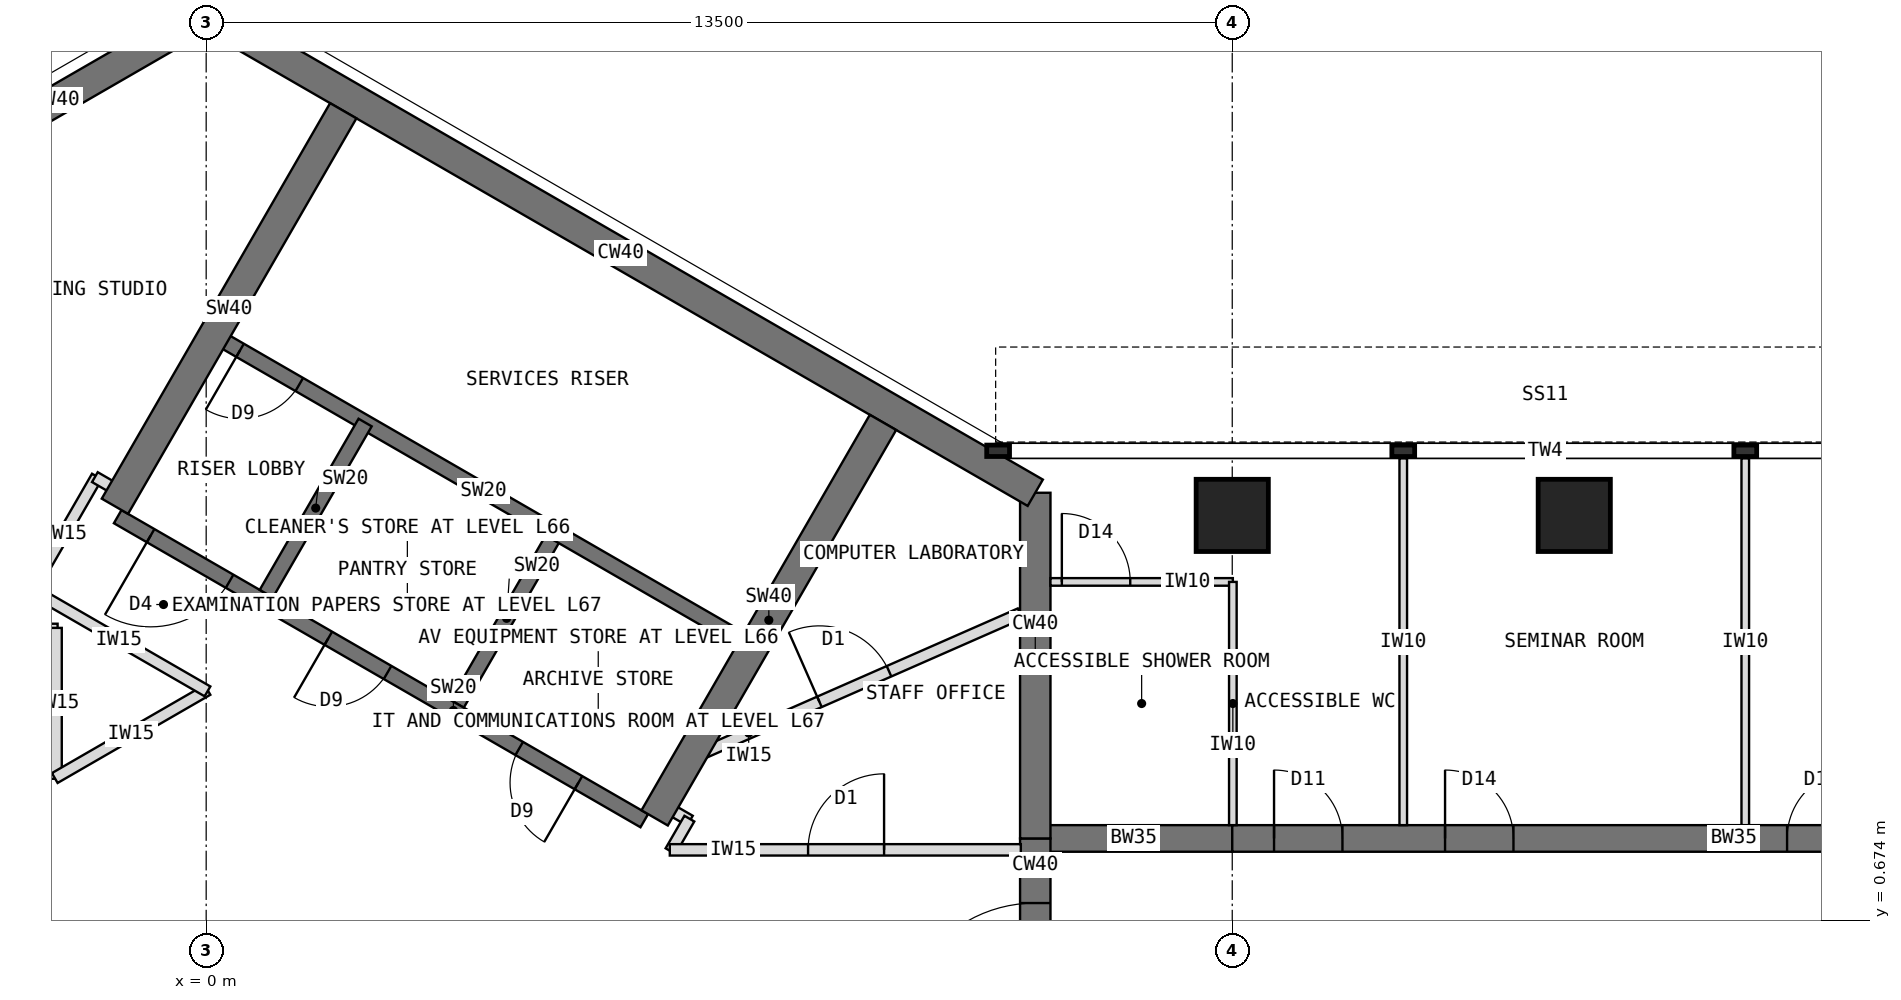
"""IFC4 building model, lengths in metres.
Left out: names, types, materials, properties, quantities, classifications, styles, units other than length and angle.
Written with IfcOpenShell. Run it as: python <this file> out.ifc"""

import sys

from ifc_helpers import new_model, si_unit, direction, frame, frame_2d, origin, origin_2d, place, context, subcontext, project, spatial, rectangle, extrude, element, fill, save


model = new_model("IFC4")
c1 = context("Model", 3, precision=1e-05, world=origin(), true_north=direction((0.0, 1.0)))
c2 = subcontext(c1, "Body", "Model", "MODEL_VIEW")
j1 = project(units=[si_unit("LENGTHUNIT", "METRE"), si_unit("PLANEANGLEUNIT", "RADIAN")], contexts=[c1])
p1 = place(None, origin())
s1 = spatial("IfcSite", under=j1, at=p1, CompositionType="ELEMENT")
p2 = place(p1, origin())
s2 = spatial("IfcBuilding", under=s1, at=p2, CompositionType="ELEMENT")
p3 = place(p2, frame((0.0, 0.0, 267.5)))
s3 = spatial("IfcBuildingStorey", under=s2, at=p3, CompositionType="ELEMENT", Elevation=267.5)
p4 = place(p3, frame((10.908, -1.75, 0.0), z_axis=(0.0, 0.0, 1.0), x_axis=(0.0, 1.0, 0.0)))
e1 = element("IfcWall", 1, at=p4, inside=s3, PredefinedType="SHEAR", context=c2, shape_type="SweptSolid", body=[
    extrude(rectangle(XDim=3.5, YDim=0.4, at=frame_2d((1.75, 0.0))), origin(), (0.0, 0.0, 1.0), 4.0),
])
p5 = place(p4, frame((0.85, 0.0, 0.0)))
e2 = element("IfcOpeningElement", 2, at=p5, cuts=e1, PredefinedType="OPENING", context=c2, shape_type="SweptSolid", body=[
    extrude(rectangle(XDim=1.8, YDim=2.1, at=frame_2d((0.9, 1.05))), frame((0.0, 0.21, 0.0), z_axis=(0.0, -1.0, 0.0), x_axis=(1.0, 0.0, 0.0)), (0.0, 0.0, 1.0), 0.42),
])
p6 = place(p3, frame((10.908, 1.75, 0.0), z_axis=(0.0, 0.0, 1.0), x_axis=(0.0, 1.0, 0.0)))
e3 = element("IfcWall", 3, at=p6, inside=s3, PredefinedType="SHEAR", context=c2, shape_type="SweptSolid", body=[
    extrude(rectangle(XDim=4.548, YDim=0.4, at=frame_2d((2.274, 0.0))), origin(), (0.0, 0.0, 1.0), 4.0),
])
p7 = place(p3, frame((10.908, 6.298, 0.0), z_axis=(0.0, 0.0, 1.0), x_axis=(-0.866021940709, 0.500005998175, 0.0)))
e4 = element("IfcWall", 4, at=p7, inside=s3, PredefinedType="SHEAR", context=c2, shape_type="SweptSolid", body=[
    extrude(rectangle(XDim=12.596, YDim=0.4, at=frame_2d((6.298, 0.0))), origin(), (0.0, 0.0, 1.0), 4.0),
])
p8 = place(p3, frame((0.0, 12.596, 0.0), z_axis=(0.0, 0.0, 1.0), x_axis=(-0.866011268655, -0.500024481964, 0.0)))
e5 = element("IfcWall", 5, at=p8, inside=s3, PredefinedType="SHEAR", context=c2, shape_type="SweptSolid", body=[
    extrude(rectangle(XDim=4.548, YDim=0.4, at=frame_2d((2.274, 0.0))), origin(), (0.0, 0.0, 1.0), 4.0),
])
p9 = place(p3, frame((10.908, 1.75, 0.0), z_axis=(0.0, 0.0, 1.0), x_axis=(1.0, 0.0, 0.0)))
e6 = element("IfcWall", 6, at=p9, inside=s3, PredefinedType="SHEAR", context=c2, shape_type="SweptSolid", body=[
    extrude(rectangle(XDim=2.592, YDim=0.35, at=frame_2d((1.296, 0.0))), origin(), (0.0, 0.0, 1.0), 4.0),
])
p10 = place(p3, frame((13.5, 1.75, 0.0), z_axis=(0.0, 0.0, 1.0), x_axis=(1.0, 0.0, 0.0)))
e7 = element("IfcWall", 7, at=p10, inside=s3, PredefinedType="SHEAR", context=c2, shape_type="SweptSolid", body=[
    extrude(rectangle(XDim=13.2, YDim=0.35, at=frame_2d((6.6, 0.0))), origin(), (0.0, 0.0, 1.0), 4.0),
])
p11 = place(p10, frame((0.55, 0.0, 0.0)))
e8 = element("IfcOpeningElement", 8, at=p11, cuts=e7, PredefinedType="OPENING", context=c2, shape_type="SweptSolid", body=[
    extrude(rectangle(XDim=0.9, YDim=2.1, at=frame_2d((0.45, 1.05))), frame((0.0, 0.185, 0.0), z_axis=(0.0, -1.0, 0.0), x_axis=(1.0, 0.0, 0.0)), (0.0, 0.0, 1.0), 0.37),
])
p12 = place(p10, frame((2.8, 0.0, 0.0)))
e9 = element("IfcOpeningElement", 9, at=p12, cuts=e7, PredefinedType="OPENING", context=c2, shape_type="SweptSolid", body=[
    extrude(rectangle(XDim=0.9, YDim=2.1, at=frame_2d((0.45, 1.05))), frame((0.0, 0.185, 0.0), z_axis=(0.0, -1.0, 0.0), x_axis=(1.0, 0.0, 0.0)), (0.0, 0.0, 1.0), 0.37),
])
p13 = place(p10, frame((7.3, 0.0, 0.0)))
e10 = element("IfcOpeningElement", 10, at=p13, cuts=e7, PredefinedType="OPENING", context=c2, shape_type="SweptSolid", body=[
    extrude(rectangle(XDim=0.9, YDim=2.1, at=frame_2d((0.45, 1.05))), frame((0.0, 0.185, 0.0), z_axis=(0.0, -1.0, 0.0), x_axis=(1.0, 0.0, 0.0)), (0.0, 0.0, 1.0), 0.37),
])
for number, where, z_axis, x_axis in (
    (11, (13.5, 6.0, 0.0), (0.0, 0.0, 1.0), (1.0, 0.0, 0.0)),
    (12, (18.0, 6.0, 0.0), (0.0, 0.0, 1.0), (1.0, 0.0, 0.0)),
):
    element("IfcColumn", number, at=place(p3, frame(where, z_axis=z_axis, x_axis=x_axis)), inside=s3, PredefinedType="COLUMN", context=c2, shape_type="SweptSolid", body=[
        extrude(rectangle(XDim=0.95, YDim=0.95, at=origin_2d()), origin(), (0.0, 0.0, 1.0), 4.0),
    ])
p14 = place(p3, frame((5.764, 1.984, 0.0), z_axis=(0.0, 0.0, 1.0), x_axis=(-0.866026010844, 0.49999894854, 0.0)))
e13 = element("IfcWall", 13, at=p14, inside=s3, PredefinedType="SHEAR", context=c2, shape_type="SweptSolid", body=[
    extrude(rectangle(XDim=8.0, YDim=0.2, at=frame_2d((4.0, 0.0))), origin(), (0.0, 0.0, 1.0), 4.0),
])
p15 = place(p14, frame((6.3, 0.0, 0.0)))
e14 = element("IfcOpeningElement", 14, at=p15, cuts=e13, PredefinedType="OPENING", context=c2, shape_type="SweptSolid", body=[
    extrude(rectangle(XDim=1.2, YDim=2.1, at=frame_2d((0.6, 1.05))), frame((0.0, 0.11, 0.0), z_axis=(0.0, -1.0, 0.0), x_axis=(1.0, 0.0, 0.0)), (0.0, 0.0, 1.0), 0.22),
])
p16 = place(p14, frame((1.0, 0.0, 0.0)))
e15 = element("IfcOpeningElement", 15, at=p16, cuts=e13, PredefinedType="OPENING", context=c2, shape_type="SweptSolid", body=[
    extrude(rectangle(XDim=0.9, YDim=2.1, at=frame_2d((0.45, 1.05))), frame((0.0, 0.11, 0.0), z_axis=(0.0, -1.0, 0.0), x_axis=(1.0, 0.0, 0.0)), (0.0, 0.0, 1.0), 0.22),
])
p17 = place(p14, frame((3.9, 0.0, 0.0)))
e16 = element("IfcOpeningElement", 16, at=p17, cuts=e13, PredefinedType="OPENING", context=c2, shape_type="SweptSolid", body=[
    extrude(rectangle(XDim=0.9, YDim=2.1, at=frame_2d((0.45, 1.05))), frame((0.0, 0.11, 0.0), z_axis=(0.0, -1.0, 0.0), x_axis=(1.0, 0.0, 0.0)), (0.0, 0.0, 1.0), 0.22),
])
for number, where, z_axis, x_axis in (
    (17, (3.303, 3.52, 0.0), (0.0, 0.0, 1.0), (0.5, 0.866, 0.0)),
    (18, (0.791, 4.97, 0.0), (0.0, 0.0, 1.0), (0.5, 0.866, 0.0)),
):
    element("IfcWall", number, at=place(p3, frame(where, z_axis=z_axis, x_axis=x_axis)), inside=s3, PredefinedType="SHEAR", context=c2, shape_type="SweptSolid", body=[
        extrude(rectangle(XDim=2.6, YDim=0.2, at=frame_2d((1.3, 0.0))), origin(), (0.0, 0.0, 1.0), 4.0),
    ])
p18 = place(p3, frame((7.114, 4.322, 0.0), z_axis=(0.0, 0.0, 1.0), x_axis=(-0.866026010844, 0.49999894854, 0.0)))
e19 = element("IfcWall", 19, at=p18, inside=s3, PredefinedType="SHEAR", context=c2, shape_type="SweptSolid", body=[
    extrude(rectangle(XDim=8.0, YDim=0.2, at=frame_2d((4.0, 0.0))), origin(), (0.0, 0.0, 1.0), 4.0),
])
p19 = place(p18, frame((6.8, 0.0, 0.0)))
e20 = element("IfcOpeningElement", 20, at=p19, cuts=e19, PredefinedType="OPENING", context=c2, shape_type="SweptSolid", body=[
    extrude(rectangle(XDim=0.9, YDim=2.1, at=frame_2d((0.45, 1.05))), frame((0.0, 0.11, 0.0), z_axis=(0.0, -1.0, 0.0), x_axis=(1.0, 0.0, 0.0)), (0.0, 0.0, 1.0), 0.22),
])
for number, where, z_axis, x_axis in (
    (21, (-1.201, 6.12, 0.0), (0.0, 0.0, 1.0), (0.5, 0.866, 0.0)),
    (22, (5.901, 2.02, 0.0), (0.0, 0.0, 1.0), (0.5, 0.866, 0.0)),
):
    element("IfcWall", number, at=place(p3, frame(where, z_axis=z_axis, x_axis=x_axis)), inside=s3, PredefinedType="SHEAR", context=c2, shape_type="SweptSolid", body=[
        extrude(rectangle(XDim=6.008, YDim=0.4, at=frame_2d((3.004, 0.0))), origin(), (0.0, 0.0, 1.0), 4.0),
    ])
for number, where, z_axis, x_axis in (
    (23, (15.75, 1.925, 0.0), (0.0, 0.0, 1.0), (0.0, 1.0, 0.0)),
    (24, (20.25, 1.925, 0.0), (0.0, 0.0, 1.0), (0.0, 1.0, 0.0)),
):
    element("IfcWall", number, at=place(p3, frame(where, z_axis=z_axis, x_axis=x_axis)), inside=s3, PredefinedType="PARTITIONING", context=c2, shape_type="SweptSolid", body=[
        extrude(rectangle(XDim=4.825, YDim=0.1, at=frame_2d((2.413, 0.0))), origin(), (0.0, 0.0, 1.0), 3.8),
    ])
p20 = place(p3, frame((11.108, 5.125, 0.0), z_axis=(0.0, 0.0, 1.0), x_axis=(1.0, 0.0, 0.0)))
e25 = element("IfcWall", 25, at=p20, inside=s3, PredefinedType="PARTITIONING", context=c2, shape_type="SweptSolid", body=[
    extrude(rectangle(XDim=2.4, YDim=0.1, at=frame_2d((1.2, 0.0))), origin(), (0.0, 0.0, 1.0), 3.8),
])
p21 = place(p20, frame((0.15, 0.0, 0.0)))
e26 = element("IfcOpeningElement", 26, at=p21, cuts=e25, PredefinedType="OPENING", context=c2, shape_type="SweptSolid", body=[
    extrude(rectangle(XDim=0.9, YDim=2.1, at=frame_2d((0.45, 1.05))), frame((0.0, 0.06, 0.0), z_axis=(0.0, -1.0, 0.0), x_axis=(1.0, 0.0, 0.0)), (0.0, 0.0, 1.0), 0.12),
])
p22 = place(p3, frame((13.508, 1.925, 0.0), z_axis=(0.0, 0.0, 1.0), x_axis=(0.0, 1.0, 0.0)))
e27 = element("IfcWall", 27, at=p22, inside=s3, PredefinedType="PARTITIONING", context=c2, shape_type="SweptSolid", body=[
    extrude(rectangle(XDim=3.2, YDim=0.1, at=frame_2d((1.6, 0.0))), origin(), (0.0, 0.0, 1.0), 3.267),
])
p23 = place(p3, frame((-4.92, 4.5, 0.0), z_axis=(0.0, 0.0, 1.0), x_axis=(1.0, 0.0, 0.0)))
e28 = element("IfcWall", 28, at=p23, inside=s3, PredefinedType="PARTITIONING", context=c2, shape_type="SweptSolid", body=[
    extrude(rectangle(XDim=2.965, YDim=0.15, at=frame_2d((1.482, 0.0))), origin(), (0.0, 0.0, 1.0), 3.8),
])
p24 = place(p23, frame((0.982, 0.0, 0.0)))
e29 = element("IfcOpeningElement", 29, at=p24, cuts=e28, PredefinedType="OPENING", context=c2, shape_type="SweptSolid", body=[
    extrude(rectangle(XDim=1.0, YDim=2.1, at=frame_2d((0.5, 1.05))), frame((0.0, 0.085, 0.0), z_axis=(0.0, -1.0, 0.0), x_axis=(1.0, 0.0, 0.0)), (0.0, 0.0, 1.0), 0.17),
])
p25 = place(p3, frame((-1.975, 4.52, 0.0), z_axis=(0.0, 0.0, 1.0), x_axis=(0.0, -1.0, 0.0)))
e30 = element("IfcWall", 30, at=p25, inside=s3, PredefinedType="PARTITIONING", context=c2, shape_type="SweptSolid", body=[
    extrude(rectangle(XDim=1.985, YDim=0.15, at=frame_2d((0.993, 0.0))), origin(), (0.0, 0.0, 1.0), 3.8),
])
p26 = place(p3, frame((-1.992, 2.545, 0.0), z_axis=(0.0, 0.0, 1.0), x_axis=(0.866059450854, 0.499941024108, 0.0)))
e31 = element("IfcWall", 31, at=p26, inside=s3, PredefinedType="PARTITIONING", context=c2, shape_type="SweptSolid", body=[
    extrude(rectangle(XDim=2.321, YDim=0.15, at=frame_2d((1.16, 0.0))), origin(), (0.0, 0.0, 1.0), 3.8),
])
p27 = place(p3, frame((0.017, 3.685, 0.0), z_axis=(0.0, 0.0, 1.0), x_axis=(-0.866036099759, 0.499981473571, 0.0)))
e32 = element("IfcWall", 32, at=p27, inside=s3, PredefinedType="PARTITIONING", context=c2, shape_type="SweptSolid", body=[
    extrude(rectangle(XDim=2.692, YDim=0.15, at=frame_2d((1.346, 0.0))), origin(), (0.0, 0.0, 1.0), 3.8),
])
p28 = place(p3, frame((-2.307, 5.004, 0.0), z_axis=(0.0, 0.0, 1.0), x_axis=(0.500062521093, 0.865989304205, 0.0)))
e33 = element("IfcWall", 33, at=p28, inside=s3, PredefinedType="PARTITIONING", context=c2, shape_type="SweptSolid", body=[
    extrude(rectangle(XDim=1.74, YDim=0.15, at=frame_2d((0.87, 0.0))), origin(), (0.0, 0.0, 1.0), 3.8),
])
for number, where, z_axis, x_axis in (
    (34, (-1.464, 6.503, 0.0), (0.0, 0.0, 1.0), (0.866, -0.5, 0.0)),
    (35, (5.992, 2.198, 0.0), (0.0, 0.0, 1.0), (0.866, -0.5, 0.0)),
):
    element("IfcWall", number, at=place(p3, frame(where, z_axis=z_axis, x_axis=x_axis)), inside=s3, PredefinedType="PARTITIONING", context=c2, shape_type="SweptSolid", body=[
        extrude(rectangle(XDim=0.43, YDim=0.15, at=frame_2d((0.215, 0.0))), origin(), (0.0, 0.0, 1.0), 3.8),
    ])
p29 = place(p3, frame((6.357, 2.011, 0.0), z_axis=(0.0, 0.0, 1.0), x_axis=(-0.50033519877, -0.865831790172, 0.0)))
e36 = element("IfcWall", 36, at=p29, inside=s3, PredefinedType="PARTITIONING", context=c2, shape_type="SweptSolid", body=[
    extrude(rectangle(XDim=0.494, YDim=0.15, at=frame_2d((0.247, 0.0))), origin(), (0.0, 0.0, 1.0), 3.8),
])
p30 = place(p3, frame((6.1, 1.6, 0.0), z_axis=(0.0, 0.0, 1.0), x_axis=(1.0, 0.0, 0.0)))
e37 = element("IfcWall", 37, at=p30, inside=s3, PredefinedType="PARTITIONING", context=c2, shape_type="SweptSolid", body=[
    extrude(rectangle(XDim=4.618, YDim=0.15, at=frame_2d((2.309, 0.0))), origin(), (0.0, 0.0, 1.0), 3.8),
])
p31 = place(p30, frame((1.819, 0.0, 0.0)))
e38 = element("IfcOpeningElement", 38, at=p31, cuts=e37, PredefinedType="OPENING", context=c2, shape_type="SweptSolid", body=[
    extrude(rectangle(XDim=1.0, YDim=2.1, at=frame_2d((0.5, 1.05))), frame((0.0, 0.085, 0.0), z_axis=(0.0, -1.0, 0.0), x_axis=(1.0, 0.0, 0.0)), (0.0, 0.0, 1.0), 0.17),
])
p32 = place(p3, frame((6.344, 2.789, 0.0), z_axis=(0.0, 0.0, 1.0), x_axis=(0.915438841787, 0.402457111937, 0.0)))
e39 = element("IfcWall", 39, at=p32, inside=s3, PredefinedType="PARTITIONING", context=c2, shape_type="SweptSolid", body=[
    extrude(rectangle(XDim=4.767, YDim=0.15, at=frame_2d((2.383, 0.0))), origin(), (0.0, 0.0, 1.0), 3.8),
])
p33 = place(p32, frame((1.883, 0.0, 0.0)))
e40 = element("IfcOpeningElement", 40, at=p33, cuts=e39, PredefinedType="OPENING", context=c2, shape_type="SweptSolid", body=[
    extrude(rectangle(XDim=1.0, YDim=2.1, at=frame_2d((0.5, 1.05))), frame((0.0, 0.085, 0.0), z_axis=(0.0, -1.0, 0.0), x_axis=(1.0, 0.0, 0.0)), (0.0, 0.0, 1.0), 0.17),
])
p34 = place(p15, origin())
e41 = element("IfcDoor", 41, at=p34, inside=s3, OperationType="SINGLE_SWING_RIGHT", PredefinedType="DOOR", context=c2, shape_type="SweptSolid", body=[
    extrude(rectangle(XDim=1.2, YDim=2.1, at=frame_2d((0.6, 1.05))), frame((0.0, 0.025, 0.0), z_axis=(0.0, -1.0, 0.0), x_axis=(1.0, 0.0, 0.0)), (0.0, 0.0, 1.0), 0.05),
])
fill(e14, e41)
p35 = place(p19, origin())
e42 = element("IfcDoor", 42, at=p35, inside=s3, OperationType="SINGLE_SWING_RIGHT", PredefinedType="DOOR", context=c2, shape_type="SweptSolid", body=[
    extrude(rectangle(XDim=0.9, YDim=2.1, at=frame_2d((0.45, 1.05))), frame((0.0, 0.025, 0.0), z_axis=(0.0, -1.0, 0.0), x_axis=(1.0, 0.0, 0.0)), (0.0, 0.0, 1.0), 0.05),
])
fill(e20, e42)
p36 = place(p5, origin())
e43 = element("IfcDoor", 43, at=p36, inside=s3, OperationType="DOUBLE_DOOR_DOUBLE_SWING", PredefinedType="DOOR", context=c2, shape_type="SweptSolid", body=[
    extrude(rectangle(XDim=1.8, YDim=2.1, at=frame_2d((0.9, 1.05))), frame((0.0, 0.025, 0.0), z_axis=(0.0, -1.0, 0.0), x_axis=(1.0, 0.0, 0.0)), (0.0, 0.0, 1.0), 0.05),
])
fill(e2, e43)
p37 = place(p21, origin())
e44 = element("IfcDoor", 44, at=p37, inside=s3, OperationType="SINGLE_SWING_LEFT", PredefinedType="DOOR", context=c2, shape_type="SweptSolid", body=[
    extrude(rectangle(XDim=0.9, YDim=2.1, at=frame_2d((0.45, 1.05))), frame((0.0, 0.025, 0.0), z_axis=(0.0, -1.0, 0.0), x_axis=(1.0, 0.0, 0.0)), (0.0, 0.0, 1.0), 0.05),
])
fill(e26, e44)
p38 = place(p31, origin())
e45 = element("IfcDoor", 45, at=p38, inside=s3, OperationType="SINGLE_SWING_RIGHT", PredefinedType="DOOR", context=c2, shape_type="SweptSolid", body=[
    extrude(rectangle(XDim=1.0, YDim=2.1, at=frame_2d((0.5, 1.05))), frame((0.0, 0.025, 0.0), z_axis=(0.0, -1.0, 0.0), x_axis=(1.0, 0.0, 0.0)), (0.0, 0.0, 1.0), 0.05),
])
fill(e38, e45)
p39 = place(p33, origin())
e46 = element("IfcDoor", 46, at=p39, inside=s3, OperationType="SINGLE_SWING_LEFT", PredefinedType="DOOR", context=c2, shape_type="SweptSolid", body=[
    extrude(rectangle(XDim=1.0, YDim=2.1, at=frame_2d((0.5, 1.05))), frame((0.0, 0.025, 0.0), z_axis=(0.0, -1.0, 0.0), x_axis=(1.0, 0.0, 0.0)), (0.0, 0.0, 1.0), 0.05),
])
fill(e40, e46)
p40 = place(p11, origin())
e47 = element("IfcDoor", 47, at=p40, inside=s3, OperationType="SINGLE_SWING_LEFT", PredefinedType="DOOR", context=c2, shape_type="SweptSolid", body=[
    extrude(rectangle(XDim=0.9, YDim=2.1, at=frame_2d((0.45, 1.05))), frame((0.0, 0.025, 0.0), z_axis=(0.0, -1.0, 0.0), x_axis=(1.0, 0.0, 0.0)), (0.0, 0.0, 1.0), 0.05),
])
fill(e8, e47)
p41 = place(p12, origin())
e48 = element("IfcDoor", 48, at=p41, inside=s3, OperationType="SINGLE_SWING_LEFT", PredefinedType="DOOR", context=c2, shape_type="SweptSolid", body=[
    extrude(rectangle(XDim=0.9, YDim=2.1, at=frame_2d((0.45, 1.05))), frame((0.0, 0.025, 0.0), z_axis=(0.0, -1.0, 0.0), x_axis=(1.0, 0.0, 0.0)), (0.0, 0.0, 1.0), 0.05),
])
fill(e9, e48)
p42 = place(p13, origin())
e49 = element("IfcDoor", 49, at=p42, inside=s3, OperationType="SINGLE_SWING_RIGHT", PredefinedType="DOOR", context=c2, shape_type="SweptSolid", body=[
    extrude(rectangle(XDim=0.9, YDim=2.1, at=frame_2d((0.45, 1.05))), frame((0.0, 0.025, 0.0), z_axis=(0.0, -1.0, 0.0), x_axis=(1.0, 0.0, 0.0)), (0.0, 0.0, 1.0), 0.05),
])
fill(e10, e49)
p43 = place(p16, origin())
e50 = element("IfcDoor", 50, at=p43, inside=s3, OperationType="SINGLE_SWING_LEFT", PredefinedType="DOOR", context=c2, shape_type="SweptSolid", body=[
    extrude(rectangle(XDim=0.9, YDim=2.1, at=frame_2d((0.45, 1.05))), frame((0.0, 0.025, 0.0), z_axis=(0.0, -1.0, 0.0), x_axis=(1.0, 0.0, 0.0)), (0.0, 0.0, 1.0), 0.05),
])
fill(e15, e50)
p44 = place(p17, origin())
e51 = element("IfcDoor", 51, at=p44, inside=s3, OperationType="SINGLE_SWING_RIGHT", PredefinedType="DOOR", context=c2, shape_type="SweptSolid", body=[
    extrude(rectangle(XDim=0.9, YDim=2.1, at=frame_2d((0.45, 1.05))), frame((0.0, 0.025, 0.0), z_axis=(0.0, -1.0, 0.0), x_axis=(1.0, 0.0, 0.0)), (0.0, 0.0, 1.0), 0.05),
])
fill(e16, e51)
save(model, sys.argv[1])
